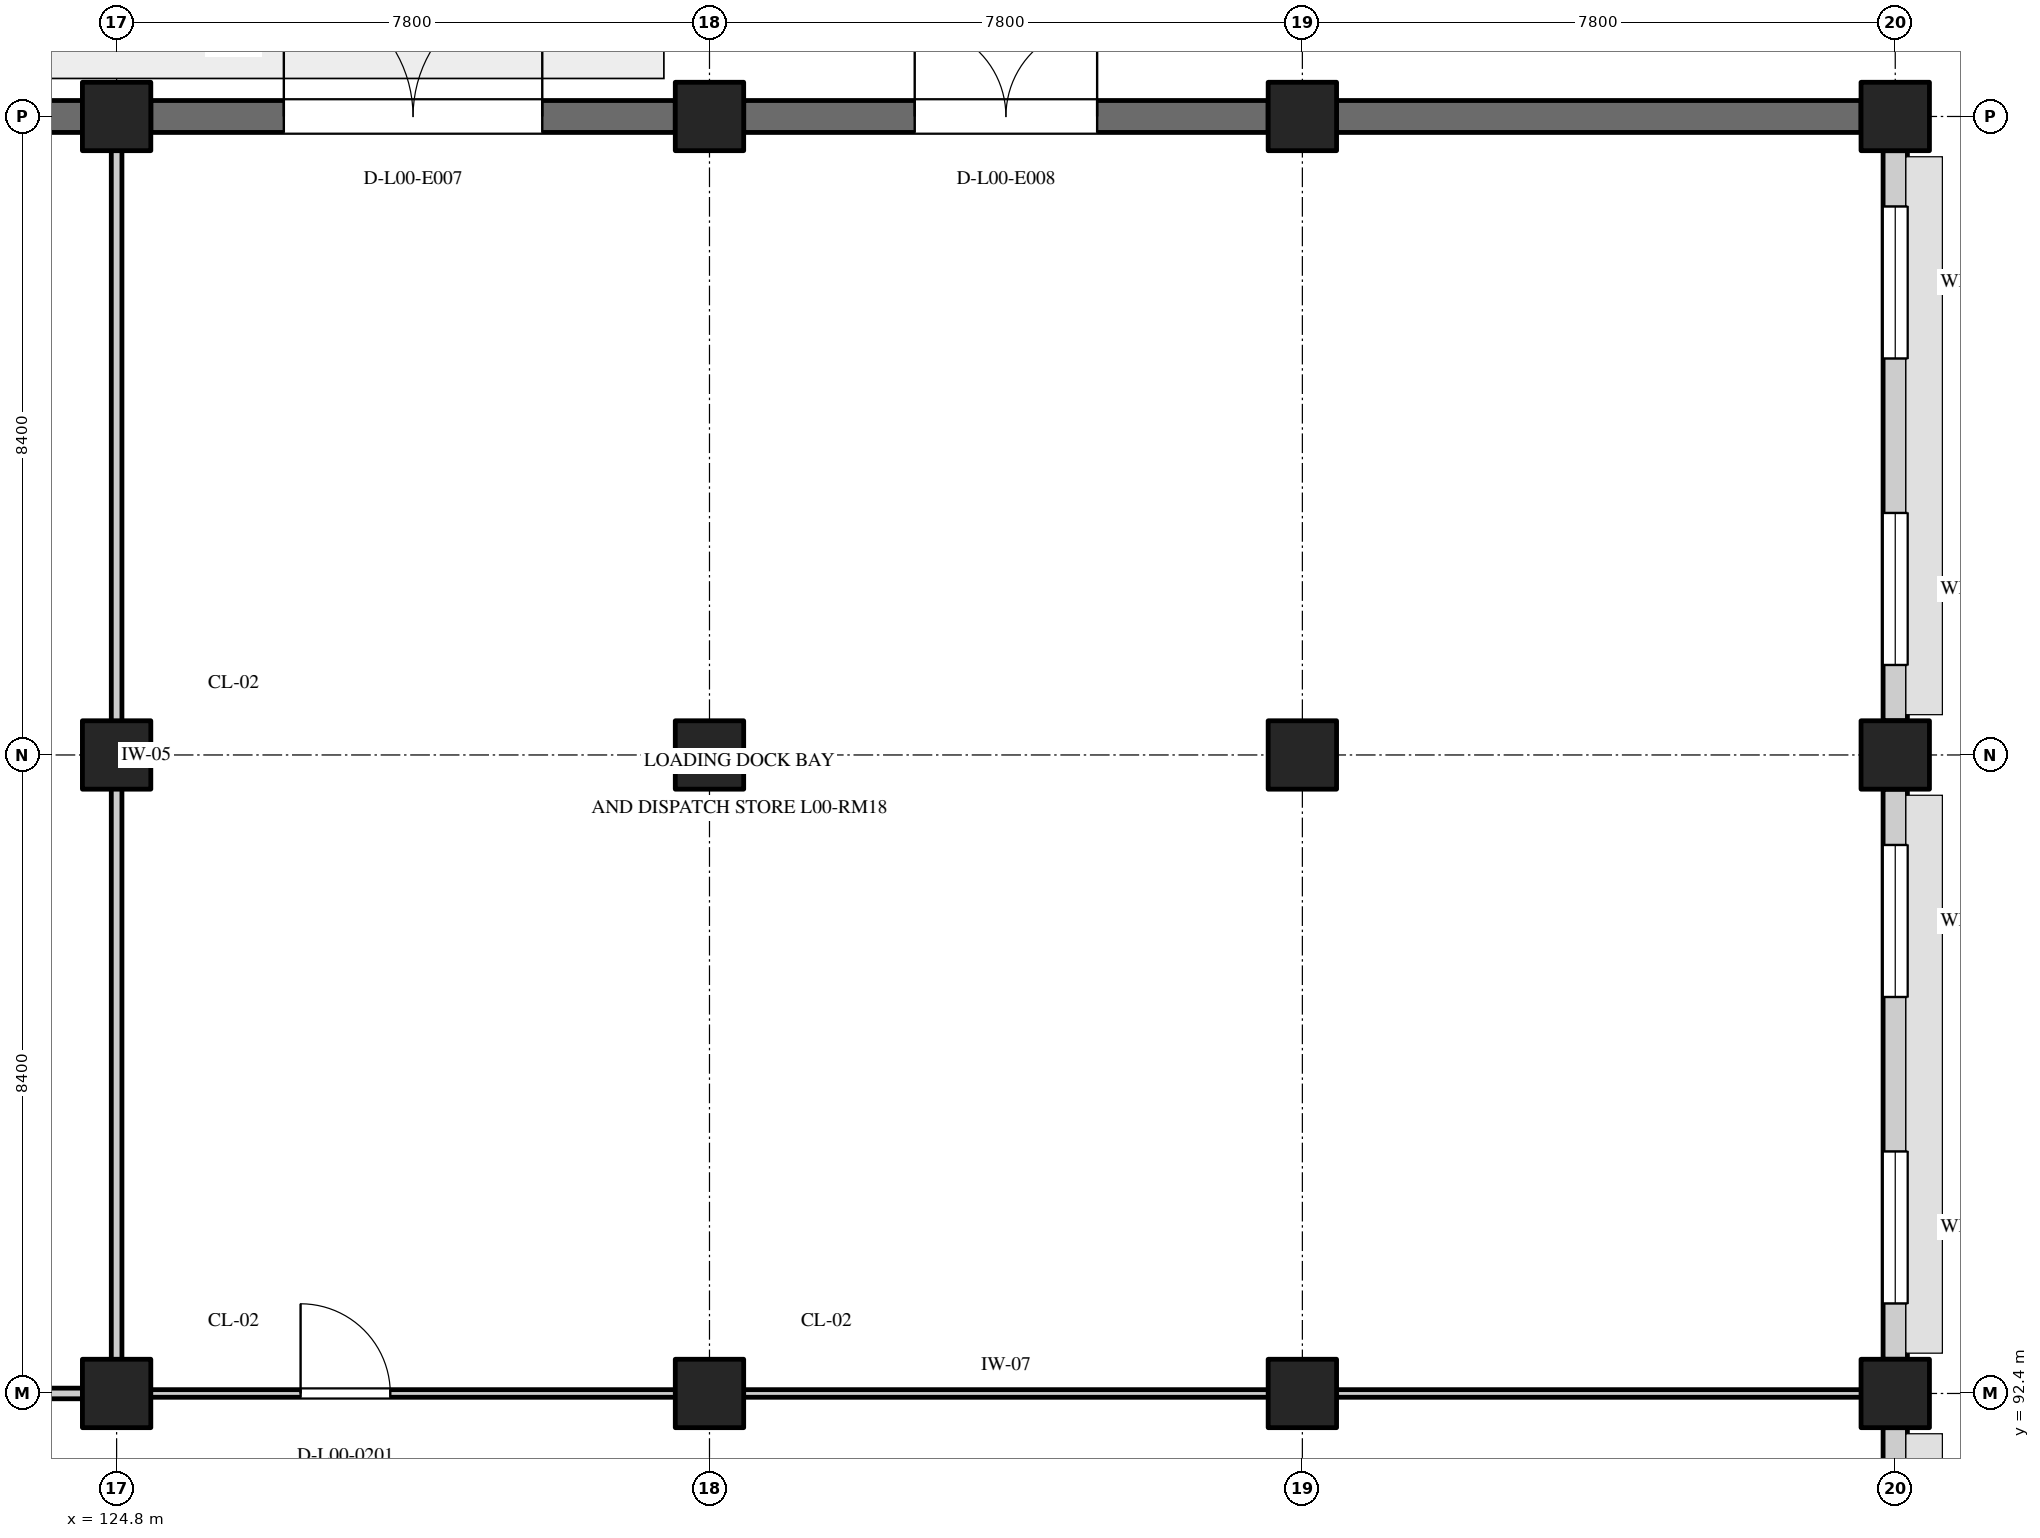
"""IFC4 building model, lengths in metres.
Left out: names, types, materials, properties, quantities, classifications, styles, units other than length and angle.
Written with IfcOpenShell. Run it as: python <this file> out.ifc"""

import sys

from ifc_helpers import new_model, si_unit, direction, frame, frame_2d, origin, origin_2d, place, context, subcontext, project, spatial, rectangle, extrude, element, fill, save


model = new_model("IFC4")
c1 = context("Model", 3, precision=1e-05, world=origin(), true_north=direction((0.0, 1.0)))
c2 = subcontext(c1, "Body", "Model", "MODEL_VIEW")
j1 = project(units=[si_unit("LENGTHUNIT", "METRE"), si_unit("PLANEANGLEUNIT", "RADIAN")], contexts=[c1])
p1 = place(None, origin())
s1 = spatial("IfcSite", under=j1, at=p1, CompositionType="ELEMENT")
p2 = place(p1, origin())
s2 = spatial("IfcBuilding", under=s1, at=p2, CompositionType="ELEMENT")
p3 = place(p2, origin())
s3 = spatial("IfcBuildingStorey", under=s2, at=p3, CompositionType="ELEMENT", Elevation=0.0)
for number, where, z_axis, x_axis in (
    (1, (124.8, 92.4, 0.0), (0.0, 0.0, 1.0), (1.0, 0.0, 0.0)),
    (2, (124.8, 100.8, 0.0), (0.0, 0.0, 1.0), (1.0, 0.0, 0.0)),
    (3, (124.8, 109.2, 0.0), (0.0, 0.0, 1.0), (1.0, 0.0, 0.0)),
    (4, (132.6, 92.4, 0.0), (0.0, 0.0, 1.0), (1.0, 0.0, 0.0)),
    (5, (132.6, 100.8, 0.0), (0.0, 0.0, 1.0), (1.0, 0.0, 0.0)),
    (6, (132.6, 109.2, 0.0), (0.0, 0.0, 1.0), (1.0, 0.0, 0.0)),
    (7, (140.4, 92.4, 0.0), (0.0, 0.0, 1.0), (1.0, 0.0, 0.0)),
    (8, (140.4, 100.8, 0.0), (0.0, 0.0, 1.0), (1.0, 0.0, 0.0)),
    (9, (140.4, 109.2, 0.0), (0.0, 0.0, 1.0), (1.0, 0.0, 0.0)),
    (10, (148.2, 92.4, 0.0), (0.0, 0.0, 1.0), (1.0, 0.0, 0.0)),
    (11, (148.2, 100.8, 0.0), (0.0, 0.0, 1.0), (1.0, 0.0, 0.0)),
    (12, (148.2, 109.2, 0.0), (0.0, 0.0, 1.0), (1.0, 0.0, 0.0)),
):
    element("IfcColumn", number, at=place(p3, frame(where, z_axis=z_axis, x_axis=x_axis)), inside=s3, PredefinedType="COLUMN", context=c2, shape_type="SweptSolid", body=[
        extrude(rectangle(XDim=0.9, YDim=0.9, at=origin_2d()), origin(), (0.0, 0.0, 1.0), 4.8),
    ])
p4 = place(p3, frame((117.45, 109.2, 0.0), z_axis=(0.0, 0.0, 1.0), x_axis=(1.0, 0.0, 0.0)))
e13 = element("IfcWall", 13, at=p4, inside=s3, PredefinedType="SOLIDWALL", context=c2, shape_type="SweptSolid", body=[
    extrude(rectangle(XDim=6.9, YDim=0.42, at=frame_2d((3.45, 0.0))), origin(), (0.0, 0.0, 1.0), 3.75),
])
p5 = place(p3, frame((125.25, 109.2, 0.0), z_axis=(0.0, 0.0, 1.0), x_axis=(1.0, 0.0, 0.0)))
e14 = element("IfcWall", 14, at=p5, inside=s3, PredefinedType="SOLIDWALL", context=c2, shape_type="SweptSolid", body=[
    extrude(rectangle(XDim=6.9, YDim=0.42, at=frame_2d((3.45, 0.0))), origin(), (0.0, 0.0, 1.0), 3.75),
])
p6 = place(p5, frame((1.75, 0.0, 0.0)))
e15 = element("IfcOpeningElement", 15, at=p6, cuts=e14, PredefinedType="OPENING", context=c2, shape_type="SweptSolid", body=[
    extrude(rectangle(XDim=3.4, YDim=3.3, at=frame_2d((1.7, 1.65))), frame((0.0, 0.222, 0.0), z_axis=(0.0, -1.0, 0.0), x_axis=(1.0, 0.0, 0.0)), (0.0, 0.0, 1.0), 0.444),
])
p7 = place(p3, frame((133.05, 109.2, 0.0), z_axis=(0.0, 0.0, 1.0), x_axis=(1.0, 0.0, 0.0)))
e16 = element("IfcWall", 16, at=p7, inside=s3, PredefinedType="SOLIDWALL", context=c2, shape_type="SweptSolid", body=[
    extrude(rectangle(XDim=6.9, YDim=0.42, at=frame_2d((3.45, 0.0))), origin(), (0.0, 0.0, 1.0), 3.75),
])
p8 = place(p7, frame((2.25, 0.0, 0.0)))
e17 = element("IfcOpeningElement", 17, at=p8, cuts=e16, PredefinedType="OPENING", context=c2, shape_type="SweptSolid", body=[
    extrude(rectangle(XDim=2.4, YDim=2.3, at=frame_2d((1.2, 1.15))), frame((0.0, 0.222, 0.0), z_axis=(0.0, -1.0, 0.0), x_axis=(1.0, 0.0, 0.0)), (0.0, 0.0, 1.0), 0.444),
])
p9 = place(p3, frame((140.85, 109.2, 0.0), z_axis=(0.0, 0.0, 1.0), x_axis=(1.0, 0.0, 0.0)))
e18 = element("IfcWall", 18, at=p9, inside=s3, PredefinedType="SOLIDWALL", context=c2, shape_type="SweptSolid", body=[
    extrude(rectangle(XDim=6.9, YDim=0.42, at=frame_2d((3.45, 0.0))), origin(), (0.0, 0.0, 1.0), 3.75),
])
p10 = place(p3, frame((148.2, 84.45, 0.0), z_axis=(0.0, 0.0, 1.0), x_axis=(0.0, 1.0, 0.0)))
e19 = element("IfcWall", 19, at=p10, inside=s3, PredefinedType="STANDARD", context=c2, shape_type="SweptSolid", body=[
    extrude(rectangle(XDim=7.5, YDim=0.32, at=frame_2d((3.75, 0.0))), origin(), (0.0, 0.0, 1.0), 3.75),
])
p11 = place(p10, frame((0.734, 0.0, 0.75)))
e20 = element("IfcOpeningElement", 20, at=p11, cuts=e19, PredefinedType="OPENING", context=c2, shape_type="SweptSolid", body=[
    extrude(rectangle(XDim=2.0, YDim=1.65, at=frame_2d((1.0, 0.825))), frame((0.0, 0.172, 0.0), z_axis=(0.0, -1.0, 0.0), x_axis=(1.0, 0.0, 0.0)), (0.0, 0.0, 1.0), 0.344),
])
p12 = place(p10, frame((4.766, 0.0, 0.75)))
e21 = element("IfcOpeningElement", 21, at=p12, cuts=e19, PredefinedType="OPENING", context=c2, shape_type="SweptSolid", body=[
    extrude(rectangle(XDim=2.0, YDim=1.65, at=frame_2d((1.0, 0.825))), frame((0.0, 0.172, 0.0), z_axis=(0.0, -1.0, 0.0), x_axis=(1.0, 0.0, 0.0)), (0.0, 0.0, 1.0), 0.344),
])
p13 = place(p3, frame((148.2, 92.85, 0.0), z_axis=(0.0, 0.0, 1.0), x_axis=(0.0, 1.0, 0.0)))
e22 = element("IfcWall", 22, at=p13, inside=s3, PredefinedType="STANDARD", context=c2, shape_type="SweptSolid", body=[
    extrude(rectangle(XDim=7.5, YDim=0.32, at=frame_2d((3.75, 0.0))), origin(), (0.0, 0.0, 1.0), 3.75),
])
p14 = place(p13, frame((0.734, 0.0, 0.75)))
e23 = element("IfcOpeningElement", 23, at=p14, cuts=e22, PredefinedType="OPENING", context=c2, shape_type="SweptSolid", body=[
    extrude(rectangle(XDim=2.0, YDim=1.55, at=frame_2d((1.0, 0.775))), frame((0.0, 0.172, 0.0), z_axis=(0.0, -1.0, 0.0), x_axis=(1.0, 0.0, 0.0)), (0.0, 0.0, 1.0), 0.344),
])
p15 = place(p13, frame((4.766, 0.0, 0.75)))
e24 = element("IfcOpeningElement", 24, at=p15, cuts=e22, PredefinedType="OPENING", context=c2, shape_type="SweptSolid", body=[
    extrude(rectangle(XDim=2.0, YDim=1.55, at=frame_2d((1.0, 0.775))), frame((0.0, 0.172, 0.0), z_axis=(0.0, -1.0, 0.0), x_axis=(1.0, 0.0, 0.0)), (0.0, 0.0, 1.0), 0.344),
])
p16 = place(p3, frame((148.2, 101.25, 0.0), z_axis=(0.0, 0.0, 1.0), x_axis=(0.0, 1.0, 0.0)))
e25 = element("IfcWall", 25, at=p16, inside=s3, PredefinedType="STANDARD", context=c2, shape_type="SweptSolid", body=[
    extrude(rectangle(XDim=7.5, YDim=0.32, at=frame_2d((3.75, 0.0))), origin(), (0.0, 0.0, 1.0), 3.75),
])
p17 = place(p16, frame((0.734, 0.0, 0.75)))
e26 = element("IfcOpeningElement", 26, at=p17, cuts=e25, PredefinedType="OPENING", context=c2, shape_type="SweptSolid", body=[
    extrude(rectangle(XDim=2.0, YDim=1.45, at=frame_2d((1.0, 0.725))), frame((0.0, 0.172, 0.0), z_axis=(0.0, -1.0, 0.0), x_axis=(1.0, 0.0, 0.0)), (0.0, 0.0, 1.0), 0.344),
])
p18 = place(p16, frame((4.766, 0.0, 0.75)))
e27 = element("IfcOpeningElement", 27, at=p18, cuts=e25, PredefinedType="OPENING", context=c2, shape_type="SweptSolid", body=[
    extrude(rectangle(XDim=2.0, YDim=1.45, at=frame_2d((1.0, 0.725))), frame((0.0, 0.172, 0.0), z_axis=(0.0, -1.0, 0.0), x_axis=(1.0, 0.0, 0.0)), (0.0, 0.0, 1.0), 0.344),
])
p19 = place(p3, frame((101.485, 92.4, 0.0), z_axis=(0.0, 0.0, 1.0), x_axis=(1.0, 0.0, 0.0)))
e28 = element("IfcWall", 28, at=p19, inside=s3, PredefinedType="PARTITIONING", context=c2, shape_type="SweptSolid", body=[
    extrude(rectangle(XDim=23.23, YDim=0.14, at=frame_2d((11.615, 0.0))), origin(), (0.0, 0.0, 1.0), 3.7),
])
p20 = place(p19, frame((2.69, 0.0, 0.0)))
e29 = element("IfcOpeningElement", 29, at=p20, cuts=e28, PredefinedType="OPENING", context=c2, shape_type="SweptSolid", body=[
    extrude(rectangle(XDim=1.18, YDim=2.2, at=frame_2d((0.59, 1.1))), frame((0.0, 0.082, 0.0), z_axis=(0.0, -1.0, 0.0), x_axis=(1.0, 0.0, 0.0)), (0.0, 0.0, 1.0), 0.164),
])
p21 = place(p3, frame((124.8, 92.485, 0.0), z_axis=(0.0, 0.0, 1.0), x_axis=(0.0, 1.0, 0.0)))
e30 = element("IfcWall", 30, at=p21, inside=s3, PredefinedType="PARTITIONING", context=c2, shape_type="SweptSolid", body=[
    extrude(rectangle(XDim=16.63, YDim=0.14, at=frame_2d((8.315, 0.0))), origin(), (0.0, 0.0, 1.0), 4.43),
])
p22 = place(p3, frame((124.885, 92.4, 0.0), z_axis=(0.0, 0.0, 1.0), x_axis=(1.0, 0.0, 0.0)))
e31 = element("IfcWall", 31, at=p22, inside=s3, PredefinedType="PARTITIONING", context=c2, shape_type="SweptSolid", body=[
    extrude(rectangle(XDim=23.23, YDim=0.1, at=frame_2d((11.615, 0.0))), origin(), (0.0, 0.0, 1.0), 3.7),
])
p23 = place(p22, frame((2.335, 0.0, 0.0)))
e32 = element("IfcOpeningElement", 32, at=p23, cuts=e31, PredefinedType="OPENING", context=c2, shape_type="SweptSolid", body=[
    extrude(rectangle(XDim=1.18, YDim=2.2, at=frame_2d((0.59, 1.1))), frame((0.0, 0.062, 0.0), z_axis=(0.0, -1.0, 0.0), x_axis=(1.0, 0.0, 0.0)), (0.0, 0.0, 1.0), 0.124),
])
for number, where, z_axis, x_axis in (
    (33, (132.19, 109.2, 0.0), (0.0, 0.0, 1.0), (1.0, 0.0, 0.0)),
    (34, (139.99, 109.2, 0.0), (0.0, 0.0, 1.0), (1.0, 0.0, 0.0)),
    (35, (148.2, 100.39, 0.0), (0.0, 0.0, 1.0), (0.0, 1.0, 0.0)),
):
    element("IfcWall", number, at=place(p3, frame(where, z_axis=z_axis, x_axis=x_axis)), inside=s3, PredefinedType="PARTITIONING", context=c2, shape_type="SweptSolid", body=[
        extrude(rectangle(XDim=0.82, YDim=0.1, at=frame_2d((0.41, 0.0))), origin(), (0.0, 0.0, 1.0), 3.7),
    ])
p24 = place(p6, origin())
e36 = element("IfcDoor", 36, at=p24, inside=s3, OperationType="DOUBLE_DOOR_SINGLE_SWING", PredefinedType="GATE", context=c2, shape_type="SweptSolid", body=[
    extrude(rectangle(XDim=3.4, YDim=3.3, at=frame_2d((1.7, 1.65))), frame((0.0, 0.025, 0.0), z_axis=(0.0, -1.0, 0.0), x_axis=(1.0, 0.0, 0.0)), (0.0, 0.0, 1.0), 0.05),
])
fill(e15, e36)
p25 = place(p8, origin())
e37 = element("IfcDoor", 37, at=p25, inside=s3, OperationType="DOUBLE_DOOR_SINGLE_SWING", PredefinedType="GATE", context=c2, shape_type="SweptSolid", body=[
    extrude(rectangle(XDim=2.4, YDim=2.3, at=frame_2d((1.2, 1.15))), frame((0.0, 0.025, 0.0), z_axis=(0.0, -1.0, 0.0), x_axis=(1.0, 0.0, 0.0)), (0.0, 0.0, 1.0), 0.05),
])
fill(e17, e37)
p26 = place(p14, origin())
e38 = element("IfcWindow", 38, at=p26, inside=s3, PartitioningType="DOUBLE_PANEL_VERTICAL", PredefinedType="WINDOW", context=c2, shape_type="SweptSolid", body=[
    extrude(rectangle(XDim=2.0, YDim=1.55, at=frame_2d((1.0, 0.775))), frame((0.0, 0.03, 0.0), z_axis=(0.0, -1.0, 0.0), x_axis=(1.0, 0.0, 0.0)), (0.0, 0.0, 1.0), 0.06),
])
fill(e23, e38)
p27 = place(p15, origin())
e39 = element("IfcWindow", 39, at=p27, inside=s3, PartitioningType="DOUBLE_PANEL_VERTICAL", PredefinedType="WINDOW", context=c2, shape_type="SweptSolid", body=[
    extrude(rectangle(XDim=2.0, YDim=1.55, at=frame_2d((1.0, 0.775))), frame((0.0, 0.03, 0.0), z_axis=(0.0, -1.0, 0.0), x_axis=(1.0, 0.0, 0.0)), (0.0, 0.0, 1.0), 0.06),
])
fill(e24, e39)
p28 = place(p17, origin())
e40 = element("IfcWindow", 40, at=p28, inside=s3, PartitioningType="DOUBLE_PANEL_VERTICAL", PredefinedType="WINDOW", context=c2, shape_type="SweptSolid", body=[
    extrude(rectangle(XDim=2.0, YDim=1.45, at=frame_2d((1.0, 0.725))), frame((0.0, 0.03, 0.0), z_axis=(0.0, -1.0, 0.0), x_axis=(1.0, 0.0, 0.0)), (0.0, 0.0, 1.0), 0.06),
])
fill(e26, e40)
p29 = place(p18, origin())
e41 = element("IfcWindow", 41, at=p29, inside=s3, PartitioningType="DOUBLE_PANEL_VERTICAL", PredefinedType="WINDOW", context=c2, shape_type="SweptSolid", body=[
    extrude(rectangle(XDim=2.0, YDim=1.45, at=frame_2d((1.0, 0.725))), frame((0.0, 0.03, 0.0), z_axis=(0.0, -1.0, 0.0), x_axis=(1.0, 0.0, 0.0)), (0.0, 0.0, 1.0), 0.06),
])
fill(e27, e41)
p30 = place(p23, origin())
e42 = element("IfcDoor", 42, at=p30, inside=s3, OperationType="SINGLE_SWING_LEFT", PredefinedType="DOOR", context=c2, shape_type="SweptSolid", body=[
    extrude(rectangle(XDim=1.18, YDim=2.2, at=frame_2d((0.59, 1.1))), frame((0.0, 0.025, 0.0), z_axis=(0.0, -1.0, 0.0), x_axis=(1.0, 0.0, 0.0)), (0.0, 0.0, 1.0), 0.05),
])
fill(e32, e42)
save(model, sys.argv[1])
